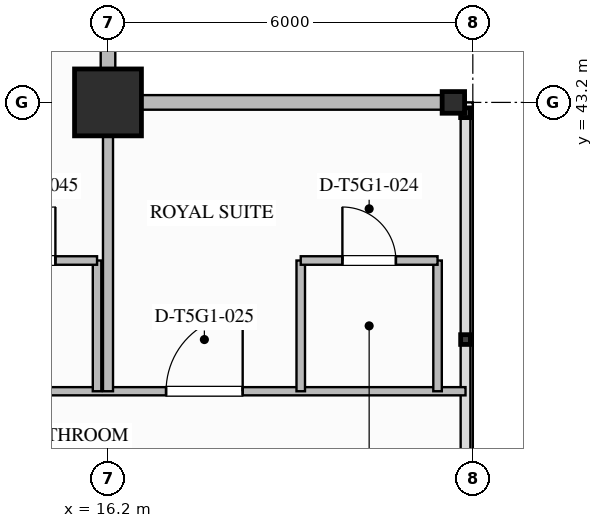
"""IFC4 building model, lengths in metres.
Left out: names, types, materials, properties, quantities, classifications, styles, units other than length and angle.
Written with IfcOpenShell. Run it as: python <this file> out.ifc"""

import sys

from ifc_helpers import new_model, si_unit, direction, frame, frame_2d, origin, origin_2d, place, context, subcontext, project, spatial, rectangle, i_section, extrude, element, fill, save


model = new_model("IFC4")
c1 = context("Model", 3, precision=1e-05, world=origin(), true_north=direction((0.0, 1.0)))
c2 = subcontext(c1, "Body", "Model", "MODEL_VIEW")
j1 = project(units=[si_unit("LENGTHUNIT", "METRE"), si_unit("PLANEANGLEUNIT", "RADIAN")], contexts=[c1])
p1 = place(None, origin())
s1 = spatial("IfcSite", under=j1, at=p1, CompositionType="ELEMENT")
p2 = place(p1, origin())
s2 = spatial("IfcBuilding", under=s1, at=p2, CompositionType="ELEMENT")
p3 = place(p2, frame((0.0, 0.0, 272.3)))
s3 = spatial("IfcBuildingStorey", under=s2, at=p3, CompositionType="ELEMENT", Elevation=272.3)
p4 = place(p3, frame((16.2, 43.2, 0.0), z_axis=(0.0, 0.0, 1.0), x_axis=(1.0, 0.0, 0.0)))
e1 = element("IfcColumn", 1, at=p4, inside=s3, PredefinedType="COLUMN", context=c2, shape_type="SweptSolid", body=[
    extrude(rectangle(XDim=1.1, YDim=1.1, at=origin_2d()), origin(), (0.0, 0.0, 1.0), 3.65),
])
p5 = place(p3, frame((21.88, 43.2, 0.0), z_axis=(0.0, 0.0, 1.0), x_axis=(1.0, 0.0, 0.0)))
e2 = element("IfcColumn", 2, at=p5, inside=s3, PredefinedType="COLUMN", context=c2, shape_type="SweptSolid", body=[
    extrude(i_section(OverallWidth=0.369, OverallDepth=0.356, WebThickness=0.011, FlangeThickness=0.018, FilletRadius=0.025, at=origin_2d()), origin(), (0.0, 0.0, 1.0), 3.647),
])
for number, where, z_axis, x_axis in (
    (3, (16.2, 49.08, 0.0), (0.0, 0.0, 1.0), (0.0, -1.0, 0.0)),
    (4, (16.2, 43.2, 0.0), (0.0, 0.0, 1.0), (1.0, 0.0, 0.0)),
):
    element("IfcWall", number, at=place(p3, frame(where, z_axis=z_axis, x_axis=x_axis)), inside=s3, PredefinedType="STANDARD", context=c2, shape_type="SweptSolid", body=[
        extrude(rectangle(XDim=5.88, YDim=0.24, at=frame_2d((2.94, 0.0))), origin(), (0.0, 0.0, 1.0), 2.779),
    ])
p6 = place(p3, frame((-16.2, 38.45, 0.0), z_axis=(0.0, 0.0, 1.0), x_axis=(1.0, 0.0, 0.0)))
e5 = element("IfcWall", 5, at=p6, inside=s3, PredefinedType="PARTITIONING", context=c2, shape_type="SweptSolid", body=[
    extrude(rectangle(XDim=38.28, YDim=0.135, at=frame_2d((19.14, 0.0))), origin(), (0.0, 0.0, 1.0), 3.39),
])
p7 = place(p6, frame((33.355, 0.0, 0.0)))
e6 = element("IfcOpeningElement", 6, at=p7, cuts=e5, PredefinedType="OPENING", context=c2, shape_type="SweptSolid", body=[
    extrude(rectangle(XDim=1.26, YDim=2.2, at=frame_2d((0.63, 1.1))), frame((0.0, 0.077, 0.0), z_axis=(0.0, -1.0, 0.0), x_axis=(1.0, 0.0, 0.0)), (0.0, 0.0, 1.0), 0.155),
])
p8 = place(p6, frame((3.435, 0.0, 0.0)))
e7 = element("IfcOpeningElement", 7, at=p8, cuts=e5, PredefinedType="OPENING", context=c2, shape_type="SweptSolid", body=[
    extrude(rectangle(XDim=0.96, YDim=2.15, at=frame_2d((0.48, 1.075))), frame((0.0, 0.077, 0.0), z_axis=(0.0, -1.0, 0.0), x_axis=(1.0, 0.0, 0.0)), (0.0, 0.0, 1.0), 0.155),
])
p9 = place(p6, frame((6.16, 0.0, 0.0)))
e8 = element("IfcOpeningElement", 8, at=p9, cuts=e5, PredefinedType="OPENING", context=c2, shape_type="SweptSolid", body=[
    extrude(rectangle(XDim=0.96, YDim=2.15, at=frame_2d((0.48, 1.075))), frame((0.0, 0.077, 0.0), z_axis=(0.0, -1.0, 0.0), x_axis=(1.0, 0.0, 0.0)), (0.0, 0.0, 1.0), 0.155),
])
p10 = place(p6, frame((13.99, 0.0, 0.0)))
e9 = element("IfcOpeningElement", 9, at=p10, cuts=e5, PredefinedType="OPENING", context=c2, shape_type="SweptSolid", body=[
    extrude(rectangle(XDim=0.96, YDim=2.15, at=frame_2d((0.48, 1.075))), frame((0.0, 0.077, 0.0), z_axis=(0.0, -1.0, 0.0), x_axis=(1.0, 0.0, 0.0)), (0.0, 0.0, 1.0), 0.155),
])
p11 = place(p6, frame((17.45, 0.0, 0.0)))
e10 = element("IfcOpeningElement", 10, at=p11, cuts=e5, PredefinedType="OPENING", context=c2, shape_type="SweptSolid", body=[
    extrude(rectangle(XDim=0.96, YDim=2.15, at=frame_2d((0.48, 1.075))), frame((0.0, 0.077, 0.0), z_axis=(0.0, -1.0, 0.0), x_axis=(1.0, 0.0, 0.0)), (0.0, 0.0, 1.0), 0.155),
])
p12 = place(p6, frame((25.281, 0.0, 0.0)))
e11 = element("IfcOpeningElement", 11, at=p12, cuts=e5, PredefinedType="OPENING", context=c2, shape_type="SweptSolid", body=[
    extrude(rectangle(XDim=0.96, YDim=2.15, at=frame_2d((0.48, 1.075))), frame((0.0, 0.077, 0.0), z_axis=(0.0, -1.0, 0.0), x_axis=(1.0, 0.0, 0.0)), (0.0, 0.0, 1.0), 0.155),
])
p13 = place(p6, frame((28.005, 0.0, 0.0)))
e12 = element("IfcOpeningElement", 12, at=p13, cuts=e5, PredefinedType="OPENING", context=c2, shape_type="SweptSolid", body=[
    extrude(rectangle(XDim=0.96, YDim=2.15, at=frame_2d((0.48, 1.075))), frame((0.0, 0.077, 0.0), z_axis=(0.0, -1.0, 0.0), x_axis=(1.0, 0.0, 0.0)), (0.0, 0.0, 1.0), 0.155),
])
p14 = place(p3, frame((16.2, 38.45, 0.0), z_axis=(0.0, 0.0, 1.0), x_axis=(0.0, 1.0, 0.0)))
e13 = element("IfcWall", 13, at=p14, inside=s3, PredefinedType="PARTITIONING", context=c2, shape_type="SweptSolid", body=[
    extrude(rectangle(XDim=4.63, YDim=0.165, at=frame_2d((2.315, 0.0))), origin(), (0.0, 0.0, 1.0), 2.764),
])
for number, where, z_axis, x_axis in (
    (14, (19.37, 38.45, 0.0), (0.0, 0.0, 1.0), (0.0, 1.0, 0.0)),
    (15, (21.62, 38.45, 0.0), (0.0, 0.0, 1.0), (0.0, 1.0, 0.0)),
):
    element("IfcWall", number, at=place(p3, frame(where, z_axis=z_axis, x_axis=x_axis)), inside=s3, PredefinedType="PLUMBINGWALL", context=c2, shape_type="SweptSolid", body=[
        extrude(rectangle(XDim=2.15, YDim=0.14, at=frame_2d((1.075, 0.0))), origin(), (0.0, 0.0, 1.0), 3.39),
    ])
p15 = place(p3, frame((19.37, 40.6, 0.0), z_axis=(0.0, 0.0, 1.0), x_axis=(1.0, 0.0, 0.0)))
e16 = element("IfcWall", 16, at=p15, inside=s3, PredefinedType="PLUMBINGWALL", context=c2, shape_type="SweptSolid", body=[
    extrude(rectangle(XDim=2.25, YDim=0.14, at=frame_2d((1.125, 0.0))), origin(), (0.0, 0.0, 1.0), 3.39),
])
p16 = place(p15, frame((0.685, 0.0, 0.0)))
e17 = element("IfcOpeningElement", 17, at=p16, cuts=e16, PredefinedType="OPENING", context=c2, shape_type="SweptSolid", body=[
    extrude(rectangle(XDim=0.88, YDim=2.1, at=frame_2d((0.44, 1.05))), frame((0.0, 0.08, 0.0), z_axis=(0.0, -1.0, 0.0), x_axis=(1.0, 0.0, 0.0)), (0.0, 0.0, 1.0), 0.16),
])
p17 = place(p3, frame((16.02, 38.45, 0.0), z_axis=(0.0, 0.0, 1.0), x_axis=(0.0, 1.0, 0.0)))
e18 = element("IfcWall", 18, at=p17, inside=s3, PredefinedType="PLUMBINGWALL", context=c2, shape_type="SweptSolid", body=[
    extrude(rectangle(XDim=2.15, YDim=0.14, at=frame_2d((1.075, 0.0))), origin(), (0.0, 0.0, 1.0), 2.764),
])
p18 = place(p3, frame((13.77, 40.6, 0.0), z_axis=(0.0, 0.0, 1.0), x_axis=(1.0, 0.0, 0.0)))
e19 = element("IfcWall", 19, at=p18, inside=s3, PredefinedType="PLUMBINGWALL", context=c2, shape_type="SweptSolid", body=[
    extrude(rectangle(XDim=2.25, YDim=0.14, at=frame_2d((1.125, 0.0))), origin(), (0.0, 0.0, 1.0), 3.39),
])
p19 = place(p18, frame((0.685, 0.0, 0.0)))
e20 = element("IfcOpeningElement", 20, at=p19, cuts=e19, PredefinedType="OPENING", context=c2, shape_type="SweptSolid", body=[
    extrude(rectangle(XDim=0.88, YDim=2.1, at=frame_2d((0.44, 1.05))), frame((0.0, 0.08, 0.0), z_axis=(0.0, -1.0, 0.0), x_axis=(1.0, 0.0, 0.0)), (0.0, 0.0, 1.0), 0.16),
])
p20 = place(p16, origin())
e21 = element("IfcDoor", 21, at=p20, inside=s3, OperationType="SINGLE_SWING_LEFT", PredefinedType="DOOR", context=c2, shape_type="SweptSolid", body=[
    extrude(rectangle(XDim=0.88, YDim=2.1, at=frame_2d((0.44, 1.05))), frame((0.0, 0.025, 0.0), z_axis=(0.0, -1.0, 0.0), x_axis=(1.0, 0.0, 0.0)), (0.0, 0.0, 1.0), 0.05),
])
fill(e17, e21)
p21 = place(p7, origin())
e22 = element("IfcDoor", 22, at=p21, inside=s3, OperationType="SINGLE_SWING_RIGHT", PredefinedType="DOOR", context=c2, shape_type="SweptSolid", body=[
    extrude(rectangle(XDim=1.26, YDim=2.2, at=frame_2d((0.63, 1.1))), frame((0.0, 0.025, 0.0), z_axis=(0.0, -1.0, 0.0), x_axis=(1.0, 0.0, 0.0)), (0.0, 0.0, 1.0), 0.05),
])
fill(e6, e22)
p22 = place(p19, origin())
e23 = element("IfcDoor", 23, at=p22, inside=s3, OperationType="SINGLE_SWING_RIGHT", PredefinedType="DOOR", context=c2, shape_type="SweptSolid", body=[
    extrude(rectangle(XDim=0.88, YDim=2.1, at=frame_2d((0.44, 1.05))), frame((0.0, 0.025, 0.0), z_axis=(0.0, -1.0, 0.0), x_axis=(1.0, 0.0, 0.0)), (0.0, 0.0, 1.0), 0.05),
])
fill(e20, e23)
save(model, sys.argv[1])
